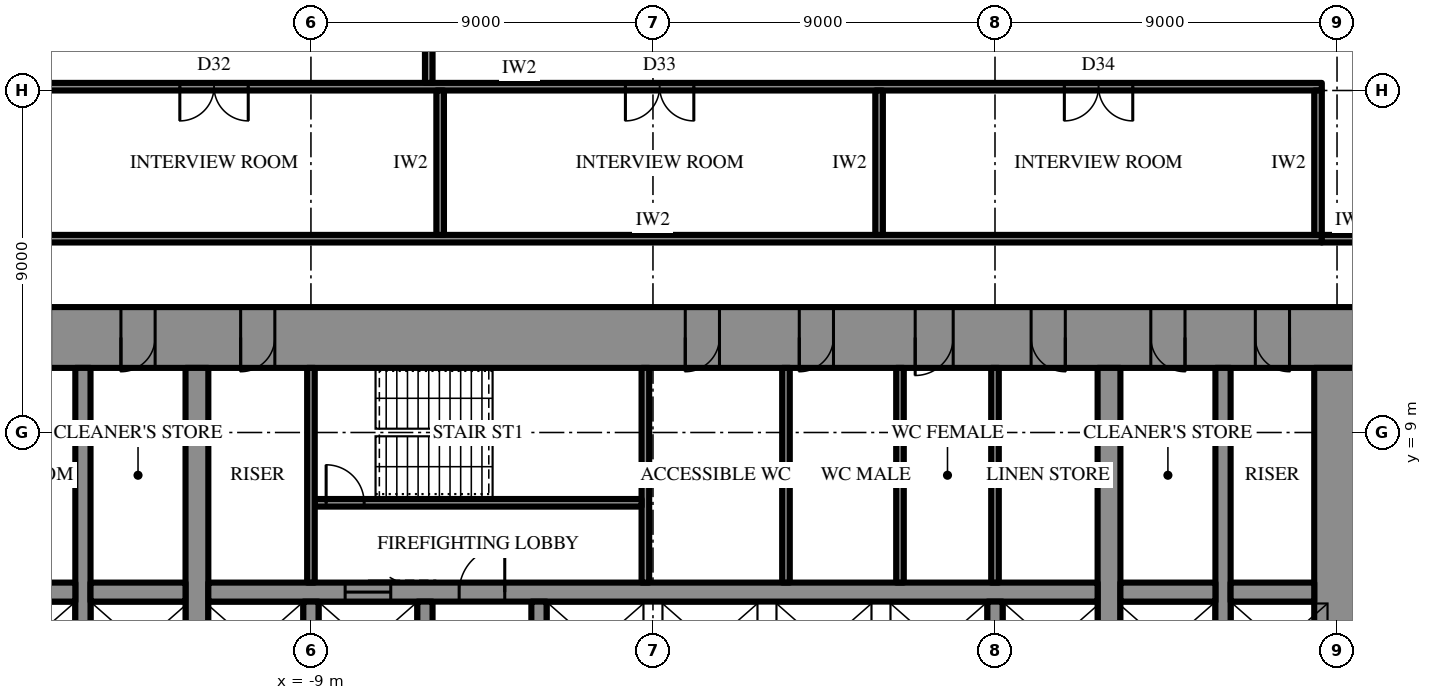
"""IFC4 building model, lengths in metres.
Left out: names, types, materials, properties, quantities, classifications, styles, units other than length and angle.
Written with IfcOpenShell. Run it as: python <this file> out.ifc"""

import sys

from ifc_helpers import new_model, si_unit, direction, frame, frame_2d, origin, place, context, subcontext, project, spatial, rectangle, extrude, element, fill, save


model = new_model("IFC4")
c1 = context("Model", 3, precision=1e-05, world=origin(), true_north=direction((0.0, 1.0)))
c2 = subcontext(c1, "Body", "Model", "MODEL_VIEW")
j1 = project(units=[si_unit("LENGTHUNIT", "METRE"), si_unit("PLANEANGLEUNIT", "RADIAN")], contexts=[c1])
p1 = place(None, origin())
s1 = spatial("IfcSite", under=j1, at=p1, CompositionType="ELEMENT")
p2 = place(p1, origin())
s2 = spatial("IfcBuilding", under=s1, at=p2, CompositionType="ELEMENT")
p3 = place(p2, frame((0.0, 0.0, 82.3)))
s3 = spatial("IfcBuildingStorey", under=s2, at=p3, CompositionType="ELEMENT", Elevation=82.3)
p4 = place(p3, frame((-18.6, 11.5, 0.0), z_axis=(0.0, 0.0, 1.0), x_axis=(1.0, 0.0, 0.0)))
e1 = element("IfcWall", 1, at=p4, inside=s3, PredefinedType="SHEAR", context=c2, shape_type="SweptSolid", body=[
    extrude(rectangle(XDim=37.2, YDim=1.6, at=frame_2d((18.6, 0.0))), origin(), (0.0, 0.0, 1.0), 4.2),
])
p5 = place(p4, frame((19.45, 0.0, 0.0)))
e2 = element("IfcOpeningElement", 2, at=p5, cuts=e1, PredefinedType="OPENING", context=c2, shape_type="SweptSolid", body=[
    extrude(rectangle(XDim=0.9, YDim=2.2, at=frame_2d((0.45, 1.1))), frame((0.0, 0.81, 0.0), z_axis=(0.0, -1.0, 0.0), x_axis=(1.0, 0.0, 0.0)), (0.0, 0.0, 1.0), 1.62),
])
p6 = place(p4, frame((22.45, 0.0, 0.0)))
e3 = element("IfcOpeningElement", 3, at=p6, cuts=e1, PredefinedType="OPENING", context=c2, shape_type="SweptSolid", body=[
    extrude(rectangle(XDim=0.9, YDim=2.2, at=frame_2d((0.45, 1.1))), frame((0.0, 0.81, 0.0), z_axis=(0.0, -1.0, 0.0), x_axis=(1.0, 0.0, 0.0)), (0.0, 0.0, 1.0), 1.62),
])
p7 = place(p4, frame((25.5, 0.0, 0.0)))
e4 = element("IfcOpeningElement", 4, at=p7, cuts=e1, PredefinedType="OPENING", context=c2, shape_type="SweptSolid", body=[
    extrude(rectangle(XDim=1.0, YDim=2.2, at=frame_2d((0.5, 1.1))), frame((0.0, 0.81, 0.0), z_axis=(0.0, -1.0, 0.0), x_axis=(1.0, 0.0, 0.0)), (0.0, 0.0, 1.0), 1.62),
])
p8 = place(p4, frame((1.85, 0.0, 0.0)))
e5 = element("IfcOpeningElement", 5, at=p8, cuts=e1, PredefinedType="OPENING", context=c2, shape_type="SweptSolid", body=[
    extrude(rectangle(XDim=0.9, YDim=2.2, at=frame_2d((0.45, 1.1))), frame((0.0, 0.81, 0.0), z_axis=(0.0, -1.0, 0.0), x_axis=(1.0, 0.0, 0.0)), (0.0, 0.0, 1.0), 1.62),
])
p9 = place(p4, frame((4.6, 0.0, 0.0)))
e6 = element("IfcOpeningElement", 6, at=p9, cuts=e1, PredefinedType="OPENING", context=c2, shape_type="SweptSolid", body=[
    extrude(rectangle(XDim=0.9, YDim=2.2, at=frame_2d((0.45, 1.1))), frame((0.0, 0.81, 0.0), z_axis=(0.0, -1.0, 0.0), x_axis=(1.0, 0.0, 0.0)), (0.0, 0.0, 1.0), 1.62),
])
p10 = place(p4, frame((7.75, 0.0, 0.0)))
e7 = element("IfcOpeningElement", 7, at=p10, cuts=e1, PredefinedType="OPENING", context=c2, shape_type="SweptSolid", body=[
    extrude(rectangle(XDim=0.9, YDim=2.2, at=frame_2d((0.45, 1.1))), frame((0.0, 0.81, 0.0), z_axis=(0.0, -1.0, 0.0), x_axis=(1.0, 0.0, 0.0)), (0.0, 0.0, 1.0), 1.62),
])
p11 = place(p4, frame((28.55, 0.0, 0.0)))
e8 = element("IfcOpeningElement", 8, at=p11, cuts=e1, PredefinedType="OPENING", context=c2, shape_type="SweptSolid", body=[
    extrude(rectangle(XDim=0.9, YDim=2.2, at=frame_2d((0.45, 1.1))), frame((0.0, 0.81, 0.0), z_axis=(0.0, -1.0, 0.0), x_axis=(1.0, 0.0, 0.0)), (0.0, 0.0, 1.0), 1.62),
])
p12 = place(p4, frame((31.7, 0.0, 0.0)))
e9 = element("IfcOpeningElement", 9, at=p12, cuts=e1, PredefinedType="OPENING", context=c2, shape_type="SweptSolid", body=[
    extrude(rectangle(XDim=0.9, YDim=2.2, at=frame_2d((0.45, 1.1))), frame((0.0, 0.81, 0.0), z_axis=(0.0, -1.0, 0.0), x_axis=(1.0, 0.0, 0.0)), (0.0, 0.0, 1.0), 1.62),
])
p13 = place(p4, frame((34.45, 0.0, 0.0)))
e10 = element("IfcOpeningElement", 10, at=p13, cuts=e1, PredefinedType="OPENING", context=c2, shape_type="SweptSolid", body=[
    extrude(rectangle(XDim=0.9, YDim=2.2, at=frame_2d((0.45, 1.1))), frame((0.0, 0.81, 0.0), z_axis=(0.0, -1.0, 0.0), x_axis=(1.0, 0.0, 0.0)), (0.0, 0.0, 1.0), 1.62),
])
p14 = place(p3, frame((18.0, -10.7, 0.0), z_axis=(0.0, 0.0, 1.0), x_axis=(0.0, 1.0, 0.0)))
e11 = element("IfcWall", 11, at=p14, inside=s3, PredefinedType="SHEAR", context=c2, shape_type="SweptSolid", body=[
    extrude(rectangle(XDim=21.4, YDim=1.2, at=frame_2d((10.7, 0.0))), origin(), (0.0, 0.0, 1.0), 4.2),
])
p15 = place(p14, frame((9.8, 0.0, 0.0)))
e12 = element("IfcOpeningElement", 12, at=p15, cuts=e11, PredefinedType="OPENING", context=c2, shape_type="SweptSolid", body=[
    extrude(rectangle(XDim=1.8, YDim=2.4, at=frame_2d((0.9, 1.2))), frame((0.0, 0.61, 0.0), z_axis=(0.0, -1.0, 0.0), x_axis=(1.0, 0.0, 0.0)), (0.0, 0.0, 1.0), 1.22),
])
p16 = place(p3, frame((12.0, -10.7, 0.0), z_axis=(0.0, 0.0, 1.0), x_axis=(0.0, 1.0, 0.0)))
e13 = element("IfcWall", 13, at=p16, inside=s3, PredefinedType="SHEAR", context=c2, shape_type="SweptSolid", body=[
    extrude(rectangle(XDim=21.4, YDim=0.6, at=frame_2d((10.7, 0.0))), origin(), (0.0, 0.0, 1.0), 4.2),
])
p17 = place(p16, frame((9.8, 0.0, 0.0)))
e14 = element("IfcOpeningElement", 14, at=p17, cuts=e13, PredefinedType="OPENING", context=c2, shape_type="SweptSolid", body=[
    extrude(rectangle(XDim=1.8, YDim=2.4, at=frame_2d((0.9, 1.2))), frame((0.0, 0.31, 0.0), z_axis=(0.0, -1.0, 0.0), x_axis=(1.0, 0.0, 0.0)), (0.0, 0.0, 1.0), 0.62),
])
p18 = place(p3, frame((-12.0, -10.7, 0.0), z_axis=(0.0, 0.0, 1.0), x_axis=(0.0, 1.0, 0.0)))
e15 = element("IfcWall", 15, at=p18, inside=s3, PredefinedType="SHEAR", context=c2, shape_type="SweptSolid", body=[
    extrude(rectangle(XDim=21.4, YDim=0.6, at=frame_2d((10.7, 0.0))), origin(), (0.0, 0.0, 1.0), 4.2),
])
p19 = place(p18, frame((9.8, 0.0, 0.0)))
e16 = element("IfcOpeningElement", 16, at=p19, cuts=e15, PredefinedType="OPENING", context=c2, shape_type="SweptSolid", body=[
    extrude(rectangle(XDim=1.8, YDim=2.4, at=frame_2d((0.9, 1.2))), frame((0.0, 0.31, 0.0), z_axis=(0.0, -1.0, 0.0), x_axis=(1.0, 0.0, 0.0)), (0.0, 0.0, 1.0), 0.62),
])
p20 = place(p3, frame((15.0, -10.7, 0.0), z_axis=(0.0, 0.0, 1.0), x_axis=(0.0, 1.0, 0.0)))
e17 = element("IfcWall", 17, at=p20, inside=s3, PredefinedType="SHEAR", context=c2, shape_type="SweptSolid", body=[
    extrude(rectangle(XDim=21.4, YDim=0.4, at=frame_2d((10.7, 0.0))), origin(), (0.0, 0.0, 1.0), 4.2),
])
p21 = place(p20, frame((9.8, 0.0, 0.0)))
e18 = element("IfcOpeningElement", 18, at=p21, cuts=e17, PredefinedType="OPENING", context=c2, shape_type="SweptSolid", body=[
    extrude(rectangle(XDim=1.8, YDim=2.4, at=frame_2d((0.9, 1.2))), frame((0.0, 0.21, 0.0), z_axis=(0.0, -1.0, 0.0), x_axis=(1.0, 0.0, 0.0)), (0.0, 0.0, 1.0), 0.42),
])
p22 = place(p3, frame((-15.0, -10.7, 0.0), z_axis=(0.0, 0.0, 1.0), x_axis=(0.0, 1.0, 0.0)))
e19 = element("IfcWall", 19, at=p22, inside=s3, PredefinedType="SHEAR", context=c2, shape_type="SweptSolid", body=[
    extrude(rectangle(XDim=21.4, YDim=0.4, at=frame_2d((10.7, 0.0))), origin(), (0.0, 0.0, 1.0), 4.2),
])
p23 = place(p22, frame((9.8, 0.0, 0.0)))
e20 = element("IfcOpeningElement", 20, at=p23, cuts=e19, PredefinedType="OPENING", context=c2, shape_type="SweptSolid", body=[
    extrude(rectangle(XDim=1.8, YDim=2.4, at=frame_2d((0.9, 1.2))), frame((0.0, 0.21, 0.0), z_axis=(0.0, -1.0, 0.0), x_axis=(1.0, 0.0, 0.0)), (0.0, 0.0, 1.0), 0.42),
])
p24 = place(p3, frame((-17.4, 4.8, 0.0), z_axis=(0.0, 0.0, 1.0), x_axis=(1.0, 0.0, 0.0)))
e21 = element("IfcWall", 21, at=p24, inside=s3, PredefinedType="SHEAR", context=c2, shape_type="SweptSolid", body=[
    extrude(rectangle(XDim=2.2, YDim=0.5, at=frame_2d((1.1, 0.0))), origin(), (0.0, 0.0, 1.0), 4.2),
])
p25 = place(p3, frame((-14.8, 4.8, 0.0), z_axis=(0.0, 0.0, 1.0), x_axis=(1.0, 0.0, 0.0)))
e22 = element("IfcWall", 22, at=p25, inside=s3, PredefinedType="SHEAR", context=c2, shape_type="SweptSolid", body=[
    extrude(rectangle(XDim=2.5, YDim=0.5, at=frame_2d((1.25, 0.0))), origin(), (0.0, 0.0, 1.0), 4.2),
])
p26 = place(p3, frame((-11.7, 4.8, 0.0), z_axis=(0.0, 0.0, 1.0), x_axis=(1.0, 0.0, 0.0)))
e23 = element("IfcWall", 23, at=p26, inside=s3, PredefinedType="SHEAR", context=c2, shape_type="SweptSolid", body=[
    extrude(rectangle(XDim=23.4, YDim=0.5, at=frame_2d((11.7, 0.0))), origin(), (0.0, 0.0, 1.0), 4.2),
])
p27 = place(p26, frame((6.6, 0.0, 0.0)))
e24 = element("IfcOpeningElement", 24, at=p27, cuts=e23, PredefinedType="OPENING", context=c2, shape_type="SweptSolid", body=[
    extrude(rectangle(XDim=1.2, YDim=2.2, at=frame_2d((0.6, 1.1))), frame((0.0, 0.26, 0.0), z_axis=(0.0, -1.0, 0.0), x_axis=(1.0, 0.0, 0.0)), (0.0, 0.0, 1.0), 0.52),
])
p28 = place(p26, frame((3.6, 0.0, 0.0)))
e25 = element("IfcOpeningElement", 25, at=p28, cuts=e23, PredefinedType="OPENING", context=c2, shape_type="SweptSolid", body=[
    extrude(rectangle(XDim=1.2, YDim=2.2, at=frame_2d((0.6, 1.1))), frame((0.0, 0.26, 0.0), z_axis=(0.0, -1.0, 0.0), x_axis=(1.0, 0.0, 0.0)), (0.0, 0.0, 1.0), 0.52),
])
p29 = place(p3, frame((12.3, 4.8, 0.0), z_axis=(0.0, 0.0, 1.0), x_axis=(1.0, 0.0, 0.0)))
e26 = element("IfcWall", 26, at=p29, inside=s3, PredefinedType="SHEAR", context=c2, shape_type="SweptSolid", body=[
    extrude(rectangle(XDim=2.5, YDim=0.5, at=frame_2d((1.25, 0.0))), origin(), (0.0, 0.0, 1.0), 4.2),
])
p30 = place(p3, frame((15.2, 4.8, 0.0), z_axis=(0.0, 0.0, 1.0), x_axis=(1.0, 0.0, 0.0)))
e27 = element("IfcWall", 27, at=p30, inside=s3, PredefinedType="SHEAR", context=c2, shape_type="SweptSolid", body=[
    extrude(rectangle(XDim=2.2, YDim=0.5, at=frame_2d((1.1, 0.0))), origin(), (0.0, 0.0, 1.0), 4.2),
])
for number, where, z_axis, x_axis in (
    (28, (-9.0, 2.25, 0.0), (0.0, 0.0, 1.0), (0.0, 1.0, 0.0)),
    (29, (-6.0, 2.25, 0.0), (0.0, 0.0, 1.0), (0.0, 1.0, 0.0)),
    (30, (-3.0, 2.25, 0.0), (0.0, 0.0, 1.0), (0.0, 1.0, 0.0)),
    (31, (9.0, 2.25, 0.0), (0.0, 0.0, 1.0), (0.0, 1.0, 0.0)),
):
    element("IfcWall", number, at=place(p3, frame(where, z_axis=z_axis, x_axis=x_axis)), inside=s3, PredefinedType="SHEAR", context=c2, shape_type="SweptSolid", body=[
        extrude(rectangle(XDim=2.3, YDim=0.4, at=frame_2d((1.15, 0.0))), origin(), (0.0, 0.0, 1.0), 4.2),
    ])
p31 = place(p3, frame((-0.2, 5.05, 0.0), z_axis=(0.0, 0.0, 1.0), x_axis=(0.0, 1.0, 0.0)))
e32 = element("IfcWall", 32, at=p31, inside=s3, PredefinedType="SHEAR", context=c2, shape_type="SweptSolid", body=[
    extrude(rectangle(XDim=5.65, YDim=0.2, at=frame_2d((2.825, 0.0))), origin(), (0.0, 0.0, 1.0), 4.2),
])
p32 = place(p3, frame((-8.9, 7.15, 0.0), z_axis=(0.0, 0.0, 1.0), x_axis=(1.0, 0.0, 0.0)))
e33 = element("IfcWall", 33, at=p32, inside=s3, PredefinedType="SHEAR", context=c2, shape_type="SweptSolid", body=[
    extrude(rectangle(XDim=8.6, YDim=0.2, at=frame_2d((4.3, 0.0))), origin(), (0.0, 0.0, 1.0), 4.2),
])
p33 = place(p32, frame((0.3, 0.0, 0.0)))
e34 = element("IfcOpeningElement", 34, at=p33, cuts=e33, PredefinedType="OPENING", context=c2, shape_type="SweptSolid", body=[
    extrude(rectangle(XDim=1.0, YDim=2.2, at=frame_2d((0.5, 1.1))), frame((0.0, 0.11, 0.0), z_axis=(0.0, -1.0, 0.0), x_axis=(1.0, 0.0, 0.0)), (0.0, 0.0, 1.0), 0.22),
])
for number, where, z_axis, x_axis in (
    (35, (-9.0, 5.05, 0.0), (0.0, 0.0, 1.0), (0.0, 1.0, 0.0)),
    (36, (9.0, 5.05, 0.0), (0.0, 0.0, 1.0), (0.0, 1.0, 0.0)),
    (37, (3.5, 5.05, 0.0), (0.0, 0.0, 1.0), (0.0, 1.0, 0.0)),
    (38, (6.5, 5.05, 0.0), (0.0, 0.0, 1.0), (0.0, 1.0, 0.0)),
):
    element("IfcWall", number, at=place(p3, frame(where, z_axis=z_axis, x_axis=x_axis)), inside=s3, PredefinedType="PARTITIONING", context=c2, shape_type="SweptSolid", body=[
        extrude(rectangle(XDim=5.65, YDim=0.2, at=frame_2d((2.825, 0.0))), origin(), (0.0, 0.0, 1.0), 4.0),
    ])
p34 = place(p3, frame((-17.6, 14.1, 0.0), z_axis=(0.0, 0.0, 1.0), x_axis=(1.0, 0.0, 0.0)))
e39 = element("IfcWall", 39, at=p34, inside=s3, PredefinedType="PARTITIONING", context=c2, shape_type="SweptSolid", body=[
    extrude(rectangle(XDim=35.2, YDim=0.2, at=frame_2d((17.6, 0.0))), origin(), (0.0, 0.0, 1.0), 4.0),
])
p35 = place(p3, frame((-17.6, 18.1, 0.0), z_axis=(0.0, 0.0, 1.0), x_axis=(1.0, 0.0, 0.0)))
e40 = element("IfcWall", 40, at=p35, inside=s3, PredefinedType="PARTITIONING", context=c2, shape_type="SweptSolid", body=[
    extrude(rectangle(XDim=35.2, YDim=0.2, at=frame_2d((17.6, 0.0))), origin(), (0.0, 0.0, 1.0), 4.0),
])
p36 = place(p35, frame((5.15, 0.0, 0.0)))
e41 = element("IfcOpeningElement", 41, at=p36, cuts=e40, PredefinedType="OPENING", context=c2, shape_type="SweptSolid", body=[
    extrude(rectangle(XDim=1.8, YDim=2.4, at=frame_2d((0.9, 1.2))), frame((0.0, 0.11, 0.0), z_axis=(0.0, -1.0, 0.0), x_axis=(1.0, 0.0, 0.0)), (0.0, 0.0, 1.0), 0.22),
])
p37 = place(p35, frame((16.875, 0.0, 0.0)))
e42 = element("IfcOpeningElement", 42, at=p37, cuts=e40, PredefinedType="OPENING", context=c2, shape_type="SweptSolid", body=[
    extrude(rectangle(XDim=1.8, YDim=2.4, at=frame_2d((0.9, 1.2))), frame((0.0, 0.11, 0.0), z_axis=(0.0, -1.0, 0.0), x_axis=(1.0, 0.0, 0.0)), (0.0, 0.0, 1.0), 0.22),
])
p38 = place(p35, frame((28.425, 0.0, 0.0)))
e43 = element("IfcOpeningElement", 43, at=p38, cuts=e40, PredefinedType="OPENING", context=c2, shape_type="SweptSolid", body=[
    extrude(rectangle(XDim=1.8, YDim=2.4, at=frame_2d((0.9, 1.2))), frame((0.0, 0.11, 0.0), z_axis=(0.0, -1.0, 0.0), x_axis=(1.0, 0.0, 0.0)), (0.0, 0.0, 1.0), 0.22),
])
for number, where, z_axis, x_axis in (
    (44, (-5.6, 14.2, 0.0), (0.0, 0.0, 1.0), (0.0, 1.0, 0.0)),
    (45, (5.95, 14.2, 0.0), (0.0, 0.0, 1.0), (0.0, 1.0, 0.0)),
    (46, (17.5, 14.2, 0.0), (0.0, 0.0, 1.0), (0.0, 1.0, 0.0)),
):
    element("IfcWall", number, at=place(p3, frame(where, z_axis=z_axis, x_axis=x_axis)), inside=s3, PredefinedType="PARTITIONING", context=c2, shape_type="SweptSolid", body=[
        extrude(rectangle(XDim=3.8, YDim=0.2, at=frame_2d((1.9, 0.0))), origin(), (0.0, 0.0, 1.0), 4.0),
    ])
p39 = place(p3, frame((17.6, 14.1, 0.0), z_axis=(0.0, 0.0, 1.0), x_axis=(1.0, 0.0, 0.0)))
e47 = element("IfcWall", 47, at=p39, inside=s3, PredefinedType="PARTITIONING", context=c2, shape_type="SweptSolid", body=[
    extrude(rectangle(XDim=1.6, YDim=0.2, at=frame_2d((0.8, 0.0))), origin(), (0.0, 0.0, 1.0), 4.0),
])
p40 = place(p3, frame((-5.9, 18.2, 0.0), z_axis=(0.0, 0.0, 1.0), x_axis=(0.0, 1.0, 0.0)))
e48 = element("IfcWall", 48, at=p40, inside=s3, PredefinedType="PARTITIONING", context=c2, shape_type="SweptSolid", body=[
    extrude(rectangle(XDim=14.1, YDim=0.2, at=frame_2d((7.05, 0.0))), origin(), (0.0, 0.0, 1.0), 4.0),
])
p41 = place(p40, frame((0.91, 0.0, 0.0)))
e49 = element("IfcOpeningElement", 49, at=p41, cuts=e48, PredefinedType="OPENING", context=c2, shape_type="SweptSolid", body=[
    extrude(rectangle(XDim=1.0, YDim=2.2, at=frame_2d((0.5, 1.1))), frame((0.0, 0.11, 0.0), z_axis=(0.0, -1.0, 0.0), x_axis=(1.0, 0.0, 0.0)), (0.0, 0.0, 1.0), 0.22),
])
p42 = place(p27, origin())
e50 = element("IfcDoor", 50, at=p42, inside=s3, OperationType="SINGLE_SWING_LEFT", PredefinedType="DOOR", context=c2, shape_type="SweptSolid", body=[
    extrude(rectangle(XDim=1.2, YDim=2.2, at=frame_2d((0.6, 1.1))), frame((0.0, 0.025, 0.0), z_axis=(0.0, -1.0, 0.0), x_axis=(1.0, 0.0, 0.0)), (0.0, 0.0, 1.0), 0.05),
])
fill(e24, e50)
p43 = place(p33, origin())
e51 = element("IfcDoor", 51, at=p43, inside=s3, OperationType="SINGLE_SWING_RIGHT", PredefinedType="DOOR", context=c2, shape_type="SweptSolid", body=[
    extrude(rectangle(XDim=1.0, YDim=2.2, at=frame_2d((0.5, 1.1))), frame((0.0, 0.025, 0.0), z_axis=(0.0, -1.0, 0.0), x_axis=(1.0, 0.0, 0.0)), (0.0, 0.0, 1.0), 0.05),
])
fill(e34, e51)
p44 = place(p5, frame((0.9, 0.0, 0.0), z_axis=(0.0, 0.0, 1.0), x_axis=(-1.0, 0.0, 0.0)))
e52 = element("IfcDoor", 52, at=p44, inside=s3, OperationType="SINGLE_SWING_LEFT", PredefinedType="DOOR", context=c2, shape_type="SweptSolid", body=[
    extrude(rectangle(XDim=0.9, YDim=2.2, at=frame_2d((0.45, 1.1))), frame((0.0, 0.025, 0.0), z_axis=(0.0, -1.0, 0.0), x_axis=(1.0, 0.0, 0.0)), (0.0, 0.0, 1.0), 0.05),
])
fill(e2, e52)
p45 = place(p6, frame((0.9, 0.0, 0.0), z_axis=(0.0, 0.0, 1.0), x_axis=(-1.0, 0.0, 0.0)))
e53 = element("IfcDoor", 53, at=p45, inside=s3, OperationType="SINGLE_SWING_LEFT", PredefinedType="DOOR", context=c2, shape_type="SweptSolid", body=[
    extrude(rectangle(XDim=0.9, YDim=2.2, at=frame_2d((0.45, 1.1))), frame((0.0, 0.025, 0.0), z_axis=(0.0, -1.0, 0.0), x_axis=(1.0, 0.0, 0.0)), (0.0, 0.0, 1.0), 0.05),
])
fill(e3, e53)
p46 = place(p7, frame((1.0, 0.0, 0.0), z_axis=(0.0, 0.0, 1.0), x_axis=(-1.0, 0.0, 0.0)))
e54 = element("IfcDoor", 54, at=p46, inside=s3, OperationType="SINGLE_SWING_LEFT", PredefinedType="DOOR", context=c2, shape_type="SweptSolid", body=[
    extrude(rectangle(XDim=1.0, YDim=2.2, at=frame_2d((0.5, 1.1))), frame((0.0, 0.025, 0.0), z_axis=(0.0, -1.0, 0.0), x_axis=(1.0, 0.0, 0.0)), (0.0, 0.0, 1.0), 0.05),
])
fill(e4, e54)
p47 = place(p9, frame((0.9, 0.0, 0.0), z_axis=(0.0, 0.0, 1.0), x_axis=(-1.0, 0.0, 0.0)))
e55 = element("IfcDoor", 55, at=p47, inside=s3, OperationType="SINGLE_SWING_LEFT", PredefinedType="DOOR", context=c2, shape_type="SweptSolid", body=[
    extrude(rectangle(XDim=0.9, YDim=2.2, at=frame_2d((0.45, 1.1))), frame((0.0, 0.025, 0.0), z_axis=(0.0, -1.0, 0.0), x_axis=(1.0, 0.0, 0.0)), (0.0, 0.0, 1.0), 0.05),
])
fill(e6, e55)
p48 = place(p10, frame((0.9, 0.0, 0.0), z_axis=(0.0, 0.0, 1.0), x_axis=(-1.0, 0.0, 0.0)))
e56 = element("IfcDoor", 56, at=p48, inside=s3, OperationType="SINGLE_SWING_LEFT", PredefinedType="DOOR", context=c2, shape_type="SweptSolid", body=[
    extrude(rectangle(XDim=0.9, YDim=2.2, at=frame_2d((0.45, 1.1))), frame((0.0, 0.025, 0.0), z_axis=(0.0, -1.0, 0.0), x_axis=(1.0, 0.0, 0.0)), (0.0, 0.0, 1.0), 0.05),
])
fill(e7, e56)
p49 = place(p11, frame((0.9, 0.0, 0.0), z_axis=(0.0, 0.0, 1.0), x_axis=(-1.0, 0.0, 0.0)))
e57 = element("IfcDoor", 57, at=p49, inside=s3, OperationType="SINGLE_SWING_RIGHT", PredefinedType="DOOR", context=c2, shape_type="SweptSolid", body=[
    extrude(rectangle(XDim=0.9, YDim=2.2, at=frame_2d((0.45, 1.1))), frame((0.0, 0.025, 0.0), z_axis=(0.0, -1.0, 0.0), x_axis=(1.0, 0.0, 0.0)), (0.0, 0.0, 1.0), 0.05),
])
fill(e8, e57)
p50 = place(p12, frame((0.9, 0.0, 0.0), z_axis=(0.0, 0.0, 1.0), x_axis=(-1.0, 0.0, 0.0)))
e58 = element("IfcDoor", 58, at=p50, inside=s3, OperationType="SINGLE_SWING_RIGHT", PredefinedType="DOOR", context=c2, shape_type="SweptSolid", body=[
    extrude(rectangle(XDim=0.9, YDim=2.2, at=frame_2d((0.45, 1.1))), frame((0.0, 0.025, 0.0), z_axis=(0.0, -1.0, 0.0), x_axis=(1.0, 0.0, 0.0)), (0.0, 0.0, 1.0), 0.05),
])
fill(e9, e58)
p51 = place(p13, frame((0.9, 0.0, 0.0), z_axis=(0.0, 0.0, 1.0), x_axis=(-1.0, 0.0, 0.0)))
e59 = element("IfcDoor", 59, at=p51, inside=s3, OperationType="SINGLE_SWING_RIGHT", PredefinedType="DOOR", context=c2, shape_type="SweptSolid", body=[
    extrude(rectangle(XDim=0.9, YDim=2.2, at=frame_2d((0.45, 1.1))), frame((0.0, 0.025, 0.0), z_axis=(0.0, -1.0, 0.0), x_axis=(1.0, 0.0, 0.0)), (0.0, 0.0, 1.0), 0.05),
])
fill(e10, e59)
p52 = place(p28, origin())
e60 = element("IfcDoor", 60, at=p52, inside=s3, OperationType="SLIDING_TO_LEFT", PredefinedType="DOOR", context=c2, shape_type="SweptSolid", body=[
    extrude(rectangle(XDim=1.2, YDim=2.2, at=frame_2d((0.6, 1.1))), frame((0.0, 0.025, 0.0), z_axis=(0.0, -1.0, 0.0), x_axis=(1.0, 0.0, 0.0)), (0.0, 0.0, 1.0), 0.05),
])
fill(e25, e60)
p53 = place(p36, frame((1.8, 0.0, 0.0), z_axis=(0.0, 0.0, 1.0), x_axis=(-1.0, 0.0, 0.0)))
e61 = element("IfcDoor", 61, at=p53, inside=s3, OperationType="DOUBLE_DOOR_SINGLE_SWING", PredefinedType="DOOR", context=c2, shape_type="SweptSolid", body=[
    extrude(rectangle(XDim=1.8, YDim=2.4, at=frame_2d((0.9, 1.2))), frame((0.0, 0.025, 0.0), z_axis=(0.0, -1.0, 0.0), x_axis=(1.0, 0.0, 0.0)), (0.0, 0.0, 1.0), 0.05),
])
fill(e41, e61)
p54 = place(p37, frame((1.8, 0.0, 0.0), z_axis=(0.0, 0.0, 1.0), x_axis=(-1.0, 0.0, 0.0)))
e62 = element("IfcDoor", 62, at=p54, inside=s3, OperationType="DOUBLE_DOOR_SINGLE_SWING", PredefinedType="DOOR", context=c2, shape_type="SweptSolid", body=[
    extrude(rectangle(XDim=1.8, YDim=2.4, at=frame_2d((0.9, 1.2))), frame((0.0, 0.025, 0.0), z_axis=(0.0, -1.0, 0.0), x_axis=(1.0, 0.0, 0.0)), (0.0, 0.0, 1.0), 0.05),
])
fill(e42, e62)
p55 = place(p38, frame((1.8, 0.0, 0.0), z_axis=(0.0, 0.0, 1.0), x_axis=(-1.0, 0.0, 0.0)))
e63 = element("IfcDoor", 63, at=p55, inside=s3, OperationType="DOUBLE_DOOR_SINGLE_SWING", PredefinedType="DOOR", context=c2, shape_type="SweptSolid", body=[
    extrude(rectangle(XDim=1.8, YDim=2.4, at=frame_2d((0.9, 1.2))), frame((0.0, 0.025, 0.0), z_axis=(0.0, -1.0, 0.0), x_axis=(1.0, 0.0, 0.0)), (0.0, 0.0, 1.0), 0.05),
])
fill(e43, e63)
save(model, sys.argv[1])
